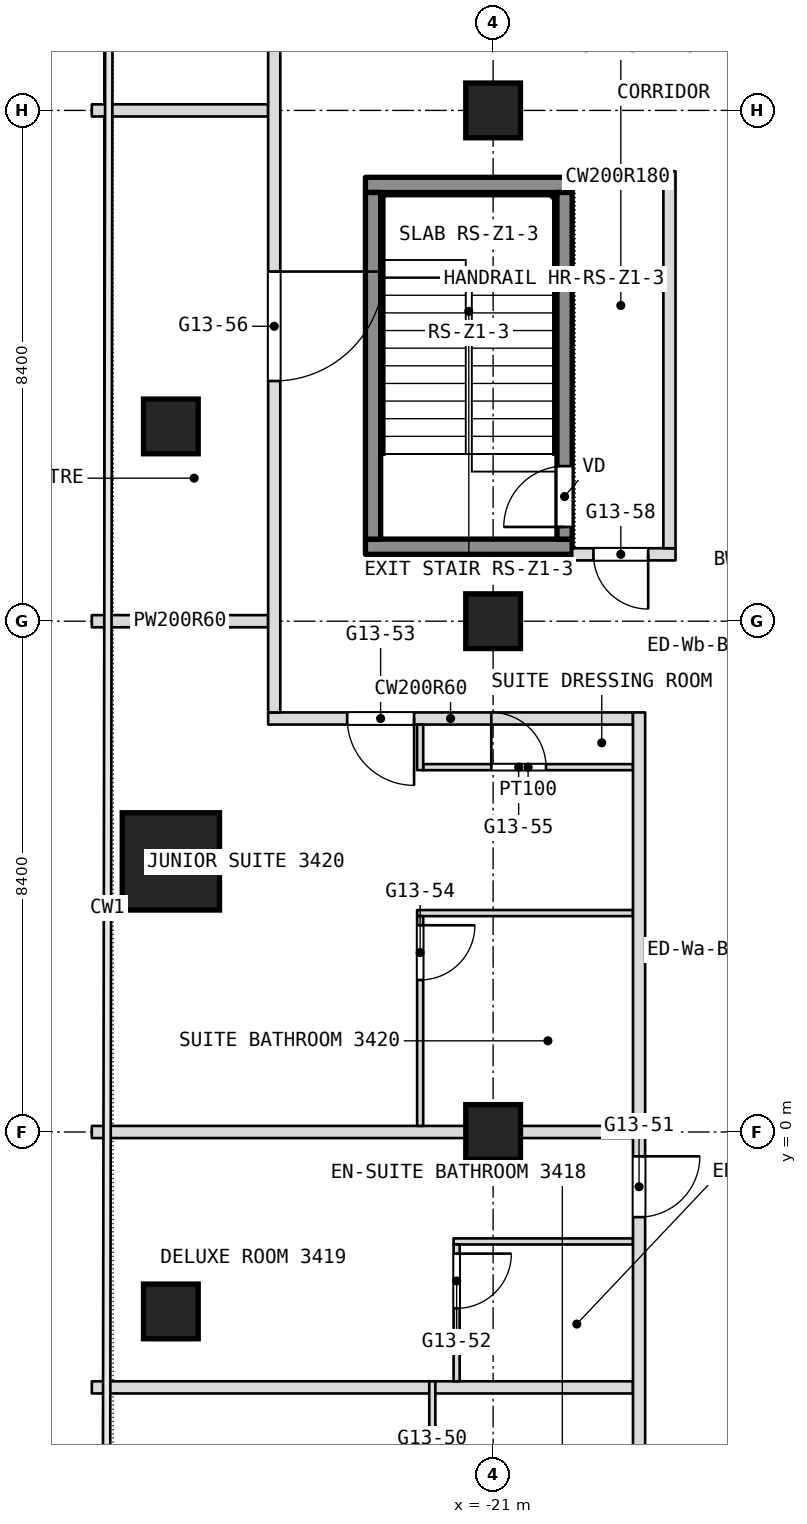
"""IFC4 building model, lengths in metres.
Left out: names, types, materials, properties, quantities, classifications, styles, units other than length and angle.
Written with IfcOpenShell. Run it as: python <this file> out.ifc"""

import sys

from ifc_helpers import new_model, si_unit, direction, frame, frame_2d, origin, origin_2d, place, context, subcontext, project, spatial, rectangle, extrude, element, fill, save


model = new_model("IFC4")
c1 = context("Model", 3, precision=1e-05, world=origin(), true_north=direction((0.0, 1.0)))
c2 = subcontext(c1, "Body", "Model", "MODEL_VIEW")
j1 = project(units=[si_unit("LENGTHUNIT", "METRE"), si_unit("PLANEANGLEUNIT", "RADIAN")], contexts=[c1])
p1 = place(None, origin())
s1 = spatial("IfcSite", under=j1, at=p1, CompositionType="ELEMENT")
p2 = place(p1, origin())
s2 = spatial("IfcBuilding", under=s1, at=p2, CompositionType="ELEMENT")
p3 = place(p2, frame((0.0, 0.0, 148.1)))
s3 = spatial("IfcBuildingStorey", under=s2, at=p3, CompositionType="ELEMENT", Elevation=148.1)
p4 = place(p3, frame((-26.3, 4.45, 0.0), z_axis=(0.0, 0.0, 1.0), x_axis=(1.0, 0.0, 0.0)))
e1 = element("IfcColumn", 1, at=p4, inside=s3, PredefinedType="COLUMN", context=c2, shape_type="SweptSolid", body=[
    extrude(rectangle(XDim=1.6, YDim=1.6, at=origin_2d()), origin(), (0.0, 0.0, 1.0), 3.6),
])
for number, where, z_axis, x_axis in (
    (2, (-21.0, 0.0, 0.0), (0.0, 0.0, 1.0), (1.0, 0.0, 0.0)),
    (3, (-21.0, 8.4, 0.0), (0.0, 0.0, 1.0), (1.0, 0.0, 0.0)),
    (4, (-21.0, 16.8, 0.0), (0.0, 0.0, 1.0), (1.0, 0.0, 0.0)),
    (5, (-26.3, -2.951, 0.0), (0.0, 0.0, 1.0), (1.0, 0.0, 0.0)),
    (6, (-26.3, 11.603, 0.0), (0.0, 0.0, 1.0), (1.0, 0.0, 0.0)),
):
    element("IfcColumn", number, at=place(p3, frame(where, z_axis=z_axis, x_axis=x_axis)), inside=s3, PredefinedType="COLUMN", context=c2, shape_type="SweptSolid", body=[
        extrude(rectangle(XDim=0.9, YDim=0.9, at=origin_2d()), origin(), (0.0, 0.0, 1.0), 3.6),
    ])
p5 = place(p3, frame((-27.6, -4.2, 0.0), z_axis=(0.0, 0.0, 1.0), x_axis=(1.0, 0.0, 0.0)))
e7 = element("IfcWall", 7, at=p5, inside=s3, PredefinedType="PARTITIONING", context=c2, shape_type="SweptSolid", body=[
    extrude(rectangle(XDim=8.9, YDim=0.2, at=frame_2d((4.45, 0.0))), origin(), (0.0, 0.0, 1.0), 3.34),
])
p6 = place(p3, frame((-21.65, -1.8, 0.0), z_axis=(0.0, 0.0, 1.0), x_axis=(1.0, 0.0, 0.0)))
e8 = element("IfcWall", 8, at=p6, inside=s3, PredefinedType="PARTITIONING", context=c2, shape_type="SweptSolid", body=[
    extrude(rectangle(XDim=2.95, YDim=0.1, at=frame_2d((1.475, 0.0))), origin(), (0.0, 0.0, 1.0), 3.34),
])
p7 = place(p3, frame((-27.6, 0.0, 0.0), z_axis=(0.0, 0.0, 1.0), x_axis=(1.0, 0.0, 0.0)))
e9 = element("IfcWall", 9, at=p7, inside=s3, PredefinedType="PARTITIONING", context=c2, shape_type="SweptSolid", body=[
    extrude(rectangle(XDim=8.9, YDim=0.2, at=frame_2d((4.45, 0.0))), origin(), (0.0, 0.0, 1.0), 2.89),
])
p8 = place(p3, frame((-22.25, 3.6, 0.0), z_axis=(0.0, 0.0, 1.0), x_axis=(1.0, 0.0, 0.0)))
e10 = element("IfcWall", 10, at=p8, inside=s3, PredefinedType="PARTITIONING", context=c2, shape_type="SweptSolid", body=[
    extrude(rectangle(XDim=3.55, YDim=0.1, at=frame_2d((1.775, 0.0))), origin(), (0.0, 0.0, 1.0), 3.34),
])
p9 = place(p3, frame((-22.15, 6.0, 0.0), z_axis=(0.0, 0.0, 1.0), x_axis=(1.0, 0.0, 0.0)))
e11 = element("IfcWall", 11, at=p9, inside=s3, PredefinedType="PARTITIONING", context=c2, shape_type="SweptSolid", body=[
    extrude(rectangle(XDim=3.45, YDim=0.1, at=frame_2d((1.725, 0.0))), origin(), (0.0, 0.0, 1.0), 3.34),
])
p10 = place(p9, frame((1.12, 0.0, 0.0)))
e12 = element("IfcOpeningElement", 12, at=p10, cuts=e11, PredefinedType="OPENING", context=c2, shape_type="SweptSolid", body=[
    extrude(rectangle(XDim=0.9, YDim=2.1, at=frame_2d((0.45, 1.05))), frame((0.0, 0.05, 0.0), z_axis=(0.0, -1.0, 0.0), x_axis=(1.0, 0.0, 0.0)), (0.0, 0.0, 1.0), 0.1),
])
p11 = place(p3, frame((-24.7, 6.8, 0.0), z_axis=(0.0, 0.0, 1.0), x_axis=(1.0, 0.0, 0.0)))
e13 = element("IfcWall", 13, at=p11, inside=s3, PredefinedType="PARTITIONING", context=c2, shape_type="SweptSolid", body=[
    extrude(rectangle(XDim=6.0, YDim=0.2, at=frame_2d((3.0, 0.0))), origin(), (0.0, 0.0, 1.0), 3.34),
])
p12 = place(p11, frame((1.3, 0.0, 0.0)))
e14 = element("IfcOpeningElement", 14, at=p12, cuts=e13, PredefinedType="OPENING", context=c2, shape_type="SweptSolid", body=[
    extrude(rectangle(XDim=1.1, YDim=2.1, at=frame_2d((0.55, 1.05))), frame((0.0, 0.1, 0.0), z_axis=(0.0, -1.0, 0.0), x_axis=(1.0, 0.0, 0.0)), (0.0, 0.0, 1.0), 0.2),
])
p13 = place(p3, frame((-27.6, 8.4, 0.0), z_axis=(0.0, 0.0, 1.0), x_axis=(1.0, 0.0, 0.0)))
e15 = element("IfcWall", 15, at=p13, inside=s3, PredefinedType="PARTITIONING", context=c2, shape_type="SweptSolid", body=[
    extrude(rectangle(XDim=2.9, YDim=0.2, at=frame_2d((1.45, 0.0))), origin(), (0.0, 0.0, 1.0), 2.89),
])
p14 = place(p3, frame((-19.7, 9.5, 0.0), z_axis=(0.0, 0.0, 1.0), x_axis=(1.0, 0.0, 0.0)))
e16 = element("IfcWall", 16, at=p14, inside=s3, PredefinedType="PARTITIONING", context=c2, shape_type="SweptSolid", body=[
    extrude(rectangle(XDim=1.7, YDim=0.2, at=frame_2d((0.85, 0.0))), origin(), (0.0, 0.0, 1.0), 3.34),
])
p15 = place(p14, frame((0.35, 0.0, 0.0)))
e17 = element("IfcOpeningElement", 17, at=p15, cuts=e16, PredefinedType="OPENING", context=c2, shape_type="SweptSolid", body=[
    extrude(rectangle(XDim=0.9, YDim=2.1, at=frame_2d((0.45, 1.05))), frame((0.0, 0.1, 0.0), z_axis=(0.0, -1.0, 0.0), x_axis=(1.0, 0.0, 0.0)), (0.0, 0.0, 1.0), 0.2),
])
p16 = place(p3, frame((-19.7, 15.7, 0.0), z_axis=(0.0, 0.0, 1.0), x_axis=(1.0, 0.0, 0.0)))
e18 = element("IfcWall", 18, at=p16, inside=s3, PredefinedType="PARTITIONING", context=c2, shape_type="SweptSolid", body=[
    extrude(rectangle(XDim=1.5, YDim=0.2, at=frame_2d((0.75, 0.0))), origin(), (0.0, 0.0, 1.0), 3.34),
])
p17 = place(p3, frame((-27.6, 16.8, 0.0), z_axis=(0.0, 0.0, 1.0), x_axis=(1.0, 0.0, 0.0)))
e19 = element("IfcWall", 19, at=p17, inside=s3, PredefinedType="PARTITIONING", context=c2, shape_type="SweptSolid", body=[
    extrude(rectangle(XDim=2.9, YDim=0.2, at=frame_2d((1.45, 0.0))), origin(), (0.0, 0.0, 1.0), 2.89),
])
p18 = place(p3, frame((-18.1, 9.6, 0.0), z_axis=(0.0, 0.0, 1.0), x_axis=(0.0, 1.0, 0.0)))
e20 = element("IfcWall", 20, at=p18, inside=s3, PredefinedType="PARTITIONING", context=c2, shape_type="SweptSolid", body=[
    extrude(rectangle(XDim=6.2, YDim=0.2, at=frame_2d((3.1, 0.0))), origin(), (0.0, 0.0, 1.0), 3.34),
])
p19 = place(p3, frame((-18.6, -21.708, 0.0), z_axis=(0.0, 0.0, 1.0), x_axis=(0.0, 1.0, 0.0)))
e21 = element("IfcWall", 21, at=p19, inside=s3, PredefinedType="PARTITIONING", context=c2, shape_type="SweptSolid", body=[
    extrude(rectangle(XDim=28.608, YDim=0.2, at=frame_2d((14.304, 0.0))), origin(), (0.0, 0.0, 1.0), 3.34),
])
p20 = place(p19, frame((2.8, 0.0, 0.0)))
e22 = element("IfcOpeningElement", 22, at=p20, cuts=e21, PredefinedType="OPENING", context=c2, shape_type="SweptSolid", body=[
    extrude(rectangle(XDim=1.0, YDim=2.1, at=frame_2d((0.5, 1.05))), frame((0.0, 0.1, 0.0), z_axis=(0.0, -1.0, 0.0), x_axis=(1.0, 0.0, 0.0)), (0.0, 0.0, 1.0), 0.2),
])
p21 = place(p19, frame((7.708, 0.0, 0.0)))
e23 = element("IfcOpeningElement", 23, at=p21, cuts=e21, PredefinedType="OPENING", context=c2, shape_type="SweptSolid", body=[
    extrude(rectangle(XDim=1.0, YDim=2.1, at=frame_2d((0.5, 1.05))), frame((0.0, 0.1, 0.0), z_axis=(0.0, -1.0, 0.0), x_axis=(1.0, 0.0, 0.0)), (0.0, 0.0, 1.0), 0.2),
])
p22 = place(p19, frame((9.508, 0.0, 0.0)))
e24 = element("IfcOpeningElement", 24, at=p22, cuts=e21, PredefinedType="OPENING", context=c2, shape_type="SweptSolid", body=[
    extrude(rectangle(XDim=1.0, YDim=2.1, at=frame_2d((0.5, 1.05))), frame((0.0, 0.1, 0.0), z_axis=(0.0, -1.0, 0.0), x_axis=(1.0, 0.0, 0.0)), (0.0, 0.0, 1.0), 0.2),
])
p23 = place(p19, frame((13.708, 0.0, 0.0)))
e25 = element("IfcOpeningElement", 25, at=p23, cuts=e21, PredefinedType="OPENING", context=c2, shape_type="SweptSolid", body=[
    extrude(rectangle(XDim=1.0, YDim=2.1, at=frame_2d((0.5, 1.05))), frame((0.0, 0.1, 0.0), z_axis=(0.0, -1.0, 0.0), x_axis=(1.0, 0.0, 0.0)), (0.0, 0.0, 1.0), 0.2),
])
p24 = place(p19, frame((20.308, 0.0, 0.0)))
e26 = element("IfcOpeningElement", 26, at=p24, cuts=e21, PredefinedType="OPENING", context=c2, shape_type="SweptSolid", body=[
    extrude(rectangle(XDim=1.0, YDim=2.1, at=frame_2d((0.5, 1.05))), frame((0.0, 0.1, 0.0), z_axis=(0.0, -1.0, 0.0), x_axis=(1.0, 0.0, 0.0)), (0.0, 0.0, 1.0), 0.2),
])
p25 = place(p3, frame((-21.6, -4.1, 0.0), z_axis=(0.0, 0.0, 1.0), x_axis=(0.0, 1.0, 0.0)))
e27 = element("IfcWall", 27, at=p25, inside=s3, PredefinedType="PARTITIONING", context=c2, shape_type="SweptSolid", body=[
    extrude(rectangle(XDim=2.25, YDim=0.1, at=frame_2d((1.125, 0.0))), origin(), (0.0, 0.0, 1.0), 3.34),
])
p26 = place(p25, frame((1.2, 0.0, 0.0)))
e28 = element("IfcOpeningElement", 28, at=p26, cuts=e27, PredefinedType="OPENING", context=c2, shape_type="SweptSolid", body=[
    extrude(rectangle(XDim=0.9, YDim=2.1, at=frame_2d((0.45, 1.05))), frame((0.0, 0.05, 0.0), z_axis=(0.0, -1.0, 0.0), x_axis=(1.0, 0.0, 0.0)), (0.0, 0.0, 1.0), 0.1),
])
p27 = place(p3, frame((-22.0, -6.65, 0.0), z_axis=(0.0, 0.0, 1.0), x_axis=(0.0, 1.0, 0.0)))
e29 = element("IfcWall", 29, at=p27, inside=s3, PredefinedType="PARTITIONING", context=c2, shape_type="SweptSolid", body=[
    extrude(rectangle(XDim=2.55, YDim=0.1, at=frame_2d((1.275, 0.0))), origin(), (0.0, 0.0, 1.0), 3.34),
])
p28 = place(p27, frame((0.15, 0.0, 0.0)))
e30 = element("IfcOpeningElement", 30, at=p28, cuts=e29, PredefinedType="OPENING", context=c2, shape_type="SweptSolid", body=[
    extrude(rectangle(XDim=0.9, YDim=2.1, at=frame_2d((0.45, 1.05))), frame((0.0, 0.05, 0.0), z_axis=(0.0, -1.0, 0.0), x_axis=(1.0, 0.0, 0.0)), (0.0, 0.0, 1.0), 0.1),
])
p29 = place(p3, frame((-22.2, 0.1, 0.0), z_axis=(0.0, 0.0, 1.0), x_axis=(0.0, 1.0, 0.0)))
e31 = element("IfcWall", 31, at=p29, inside=s3, PredefinedType="PARTITIONING", context=c2, shape_type="SweptSolid", body=[
    extrude(rectangle(XDim=3.45, YDim=0.1, at=frame_2d((1.725, 0.0))), origin(), (0.0, 0.0, 1.0), 3.34),
])
p30 = place(p29, frame((2.4, 0.0, 0.0)))
e32 = element("IfcOpeningElement", 32, at=p30, cuts=e31, PredefinedType="OPENING", context=c2, shape_type="SweptSolid", body=[
    extrude(rectangle(XDim=0.9, YDim=2.1, at=frame_2d((0.45, 1.05))), frame((0.0, 0.05, 0.0), z_axis=(0.0, -1.0, 0.0), x_axis=(1.0, 0.0, 0.0)), (0.0, 0.0, 1.0), 0.1),
])
p31 = place(p3, frame((-22.2, 5.95, 0.0), z_axis=(0.0, 0.0, 1.0), x_axis=(0.0, 1.0, 0.0)))
e33 = element("IfcWall", 33, at=p31, inside=s3, PredefinedType="PARTITIONING", context=c2, shape_type="SweptSolid", body=[
    extrude(rectangle(XDim=0.75, YDim=0.1, at=frame_2d((0.375, 0.0))), origin(), (0.0, 0.0, 1.0), 3.34),
])
p32 = place(p3, frame((-24.6, 6.9, 0.0), z_axis=(0.0, 0.0, 1.0), x_axis=(0.0, 1.0, 0.0)))
e34 = element("IfcWall", 34, at=p32, inside=s3, PredefinedType="PARTITIONING", context=c2, shape_type="SweptSolid", body=[
    extrude(rectangle(XDim=11.6, YDim=0.2, at=frame_2d((5.8, 0.0))), origin(), (0.0, 0.0, 1.0), 3.34),
])
p33 = place(p32, frame((5.45, 0.0, 0.0)))
e35 = element("IfcOpeningElement", 35, at=p33, cuts=e34, PredefinedType="OPENING", context=c2, shape_type="SweptSolid", body=[
    extrude(rectangle(XDim=1.8, YDim=2.1, at=frame_2d((0.9, 1.05))), frame((0.0, 0.1, 0.0), z_axis=(0.0, -1.0, 0.0), x_axis=(1.0, 0.0, 0.0)), (0.0, 0.0, 1.0), 0.2),
])
for number, where, z_axis, x_axis in (
    (36, (-23.1, 9.625, 0.1), (0.0, 0.0, 1.0), (1.0, 0.0, 0.0)),
    (37, (-23.1, 15.575, 0.1), (0.0, 0.0, 1.0), (1.0, 0.0, 0.0)),
):
    element("IfcWall", number, at=place(p3, frame(where, z_axis=z_axis, x_axis=x_axis)), inside=s3, PredefinedType="SHEAR", context=c2, shape_type="SweptSolid", body=[
        extrude(rectangle(XDim=3.4, YDim=0.25, at=frame_2d((1.7, 0.0))), origin(), (0.0, 0.0, 1.0), 3.6),
    ])
p34 = place(p3, frame((-22.975, 9.75, 0.1), z_axis=(0.0, 0.0, 1.0), x_axis=(0.0, 1.0, 0.0)))
e38 = element("IfcWall", 38, at=p34, inside=s3, PredefinedType="SHEAR", context=c2, shape_type="SweptSolid", body=[
    extrude(rectangle(XDim=5.7, YDim=0.25, at=frame_2d((2.85, 0.0))), origin(), (0.0, 0.0, 1.0), 3.6),
])
p35 = place(p3, frame((-19.825, 9.75, 0.1), z_axis=(0.0, 0.0, 1.0), x_axis=(0.0, 1.0, 0.0)))
e39 = element("IfcWall", 39, at=p35, inside=s3, PredefinedType="SHEAR", context=c2, shape_type="SweptSolid", body=[
    extrude(rectangle(XDim=5.7, YDim=0.25, at=frame_2d((2.85, 0.0))), origin(), (0.0, 0.0, 1.0), 3.6),
])
p36 = place(p35, frame((0.2, 0.0, 0.0)))
e40 = element("IfcOpeningElement", 40, at=p36, cuts=e39, PredefinedType="OPENING", context=c2, shape_type="SweptSolid", body=[
    extrude(rectangle(XDim=1.0, YDim=2.1, at=frame_2d((0.5, 1.05))), frame((0.0, 0.125, 0.0), z_axis=(0.0, -1.0, 0.0), x_axis=(1.0, 0.0, 0.0)), (0.0, 0.0, 1.0), 0.25),
])
p37 = place(p10, origin())
e41 = element("IfcDoor", 41, at=p37, inside=s3, OperationType="SINGLE_SWING_RIGHT", PredefinedType="DOOR", context=c2, shape_type="SweptSolid", body=[
    extrude(rectangle(XDim=0.9, YDim=2.1, at=frame_2d((0.45, 1.05))), frame((0.0, 0.025, 0.0), z_axis=(0.0, -1.0, 0.0), x_axis=(1.0, 0.0, 0.0)), (0.0, 0.0, 1.0), 0.05),
])
fill(e12, e41)
p38 = place(p12, origin())
e42 = element("IfcDoor", 42, at=p38, inside=s3, OperationType="SINGLE_SWING_LEFT", PredefinedType="DOOR", context=c2, shape_type="SweptSolid", body=[
    extrude(rectangle(XDim=1.1, YDim=2.1, at=frame_2d((0.55, 1.05))), frame((0.0, 0.025, 0.0), z_axis=(0.0, -1.0, 0.0), x_axis=(1.0, 0.0, 0.0)), (0.0, 0.0, 1.0), 0.05),
])
fill(e14, e42)
p39 = place(p15, origin())
e43 = element("IfcDoor", 43, at=p39, inside=s3, OperationType="SINGLE_SWING_RIGHT", PredefinedType="DOOR", context=c2, shape_type="SweptSolid", body=[
    extrude(rectangle(XDim=0.9, YDim=2.1, at=frame_2d((0.45, 1.05))), frame((0.0, 0.025, 0.0), z_axis=(0.0, -1.0, 0.0), x_axis=(1.0, 0.0, 0.0)), (0.0, 0.0, 1.0), 0.05),
])
fill(e17, e43)
p40 = place(p24, origin())
e44 = element("IfcDoor", 44, at=p40, inside=s3, OperationType="SINGLE_SWING_RIGHT", PredefinedType="DOOR", context=c2, shape_type="SweptSolid", body=[
    extrude(rectangle(XDim=1.0, YDim=2.1, at=frame_2d((0.5, 1.05))), frame((0.0, 0.025, 0.0), z_axis=(0.0, -1.0, 0.0), x_axis=(1.0, 0.0, 0.0)), (0.0, 0.0, 1.0), 0.05),
])
fill(e26, e44)
p41 = place(p26, origin())
e45 = element("IfcDoor", 45, at=p41, inside=s3, OperationType="SINGLE_SWING_LEFT", PredefinedType="DOOR", context=c2, shape_type="SweptSolid", body=[
    extrude(rectangle(XDim=0.9, YDim=2.1, at=frame_2d((0.45, 1.05))), frame((0.0, 0.025, 0.0), z_axis=(0.0, -1.0, 0.0), x_axis=(1.0, 0.0, 0.0)), (0.0, 0.0, 1.0), 0.05),
])
fill(e28, e45)
p42 = place(p30, origin())
e46 = element("IfcDoor", 46, at=p42, inside=s3, OperationType="SINGLE_SWING_LEFT", PredefinedType="DOOR", context=c2, shape_type="SweptSolid", body=[
    extrude(rectangle(XDim=0.9, YDim=2.1, at=frame_2d((0.45, 1.05))), frame((0.0, 0.025, 0.0), z_axis=(0.0, -1.0, 0.0), x_axis=(1.0, 0.0, 0.0)), (0.0, 0.0, 1.0), 0.05),
])
fill(e32, e46)
p43 = place(p33, origin())
e47 = element("IfcDoor", 47, at=p43, inside=s3, OperationType="DOUBLE_DOOR_SINGLE_SWING", PredefinedType="DOOR", context=c2, shape_type="SweptSolid", body=[
    extrude(rectangle(XDim=1.8, YDim=2.1, at=frame_2d((0.9, 1.05))), frame((0.0, 0.025, 0.0), z_axis=(0.0, -1.0, 0.0), x_axis=(1.0, 0.0, 0.0)), (0.0, 0.0, 1.0), 0.05),
])
fill(e35, e47)
p44 = place(p36, origin())
e48 = element("IfcDoor", 48, at=p44, inside=s3, OperationType="SINGLE_SWING_LEFT", PredefinedType="DOOR", context=c2, shape_type="SweptSolid", body=[
    extrude(rectangle(XDim=1.0, YDim=2.1, at=frame_2d((0.5, 1.05))), frame((0.0, 0.025, 0.0), z_axis=(0.0, -1.0, 0.0), x_axis=(1.0, 0.0, 0.0)), (0.0, 0.0, 1.0), 0.05),
])
fill(e40, e48)
save(model, sys.argv[1])
